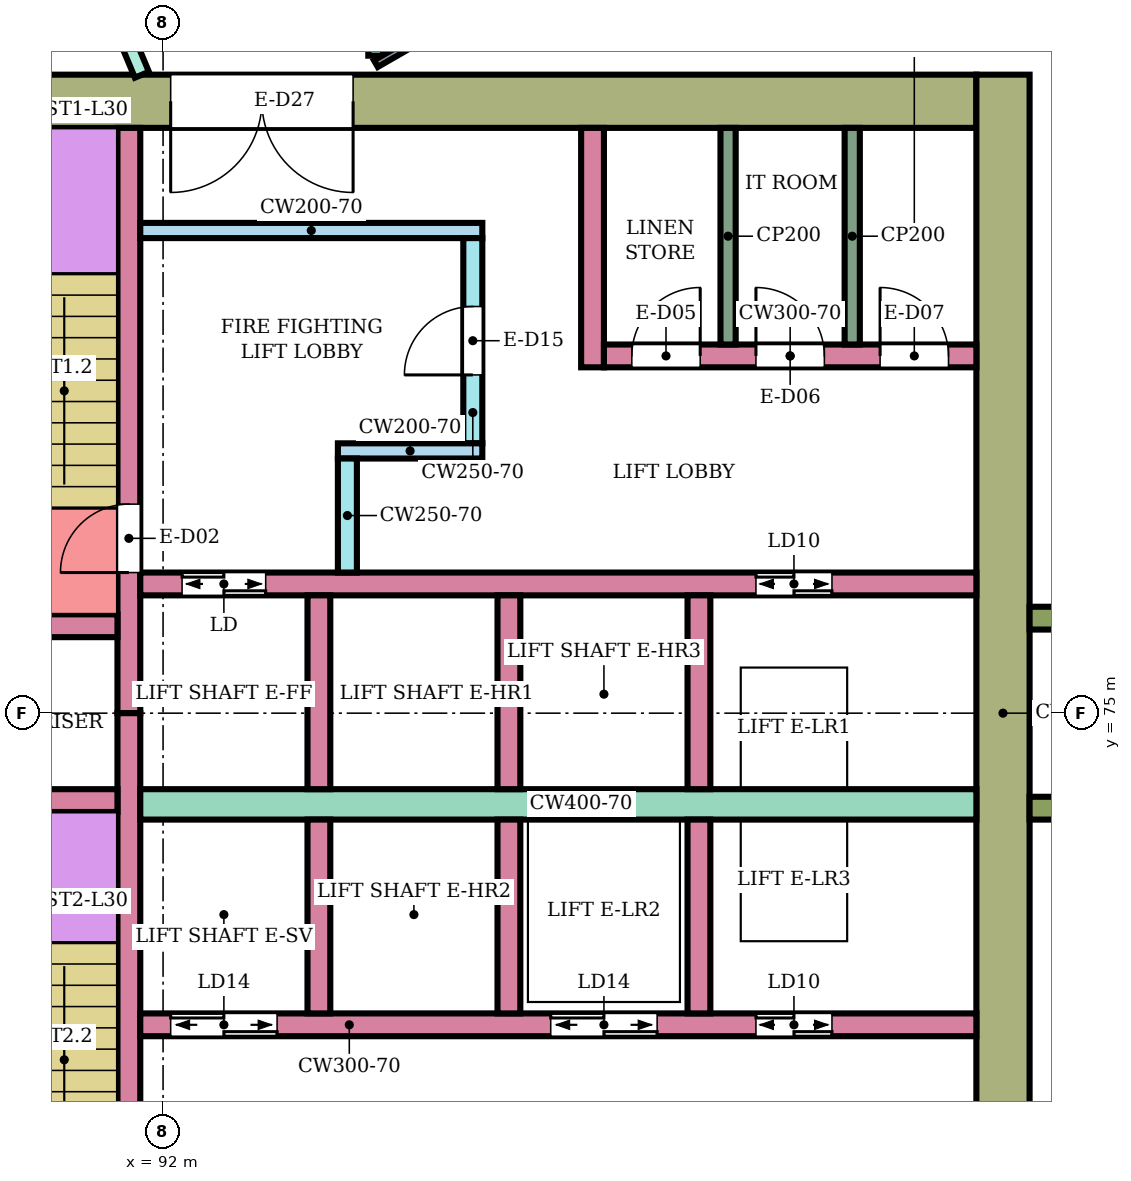
"""IFC4 building model, lengths in metres.
Left out: names, types, materials, properties, quantities, classifications, styles, units other than length and angle.
Written with IfcOpenShell. Run it as: python <this file> out.ifc"""

import sys

from ifc_helpers import new_model, si_unit, direction, frame, frame_2d, origin, place, context, subcontext, project, spatial, rectangle, extrude, element, fill, save


model = new_model("IFC4")
c1 = context("Model", 3, precision=1e-05, world=origin(), true_north=direction((0.0, 1.0)))
c2 = subcontext(c1, "Body", "Model", "MODEL_VIEW")
j1 = project(units=[si_unit("LENGTHUNIT", "METRE"), si_unit("PLANEANGLEUNIT", "RADIAN")], contexts=[c1])
p1 = place(None, origin())
s1 = spatial("IfcSite", under=j1, at=p1, CompositionType="ELEMENT")
p2 = place(p1, origin())
s2 = spatial("IfcBuilding", under=s1, at=p2, CompositionType="ELEMENT")
p3 = place(p2, frame((0.0, 0.0, 130.2)))
s3 = spatial("IfcBuildingStorey", under=s2, at=p3, CompositionType="ELEMENT", Elevation=130.2)
p4 = place(p3, frame((87.9, 83.05, 0.0), z_axis=(0.0, 0.0, 1.0), x_axis=(1.0, 0.0, 0.0)))
e1 = element("IfcWall", 1, at=p4, inside=s3, PredefinedType="SHEAR", context=c2, shape_type="SweptSolid", body=[
    extrude(rectangle(XDim=14.8, YDim=0.7, at=frame_2d((7.4, 0.0))), origin(), (0.0, 0.0, 1.0), 3.58),
])
p5 = place(p4, frame((4.2, 0.0, 0.0)))
e2 = element("IfcOpeningElement", 2, at=p5, cuts=e1, PredefinedType="OPENING", context=c2, shape_type="SweptSolid", body=[
    extrude(rectangle(XDim=2.4, YDim=2.4, at=frame_2d((1.2, 1.2))), frame((0.0, 0.36, 0.0), z_axis=(0.0, -1.0, 0.0), x_axis=(1.0, 0.0, 0.0)), (0.0, 0.0, 1.0), 0.72),
])
p6 = place(p3, frame((103.05, 66.6, 0.0), z_axis=(0.0, 0.0, 1.0), x_axis=(0.0, 1.0, 0.0)))
e3 = element("IfcWall", 3, at=p6, inside=s3, PredefinedType="SHEAR", context=c2, shape_type="SweptSolid", body=[
    extrude(rectangle(XDim=16.8, YDim=0.7, at=frame_2d((8.4, 0.0))), origin(), (0.0, 0.0, 1.0), 3.58),
])
p7 = place(p3, frame((91.55, 75.0, 0.0), z_axis=(0.0, 0.0, 1.0), x_axis=(0.0, 1.0, 0.0)))
e4 = element("IfcWall", 4, at=p7, inside=s3, PredefinedType="SHEAR", context=c2, shape_type="SweptSolid", body=[
    extrude(rectangle(XDim=7.7, YDim=0.3, at=frame_2d((3.85, 0.0))), origin(), (0.0, 0.0, 1.0), 3.58),
])
p8 = place(p7, frame((1.85, 0.0, 0.0)))
e5 = element("IfcOpeningElement", 5, at=p8, cuts=e4, PredefinedType="OPENING", context=c2, shape_type="SweptSolid", body=[
    extrude(rectangle(XDim=0.9, YDim=2.1, at=frame_2d((0.45, 1.05))), frame((0.0, 0.16, 0.0), z_axis=(0.0, -1.0, 0.0), x_axis=(1.0, 0.0, 0.0)), (0.0, 0.0, 1.0), 0.32),
])
p9 = place(p3, frame((91.55, 67.3, 0.0), z_axis=(0.0, 0.0, 1.0), x_axis=(0.0, 1.0, 0.0)))
e6 = element("IfcWall", 6, at=p9, inside=s3, PredefinedType="SHEAR", context=c2, shape_type="SweptSolid", body=[
    extrude(rectangle(XDim=7.7, YDim=0.3, at=frame_2d((3.85, 0.0))), origin(), (0.0, 0.0, 1.0), 3.58),
])
p10 = place(p9, frame((0.35, 0.0, 0.0)))
e7 = element("IfcOpeningElement", 7, at=p10, cuts=e6, PredefinedType="OPENING", context=c2, shape_type="SweptSolid", body=[
    extrude(rectangle(XDim=0.9, YDim=2.1, at=frame_2d((0.45, 1.05))), frame((0.0, 0.16, 0.0), z_axis=(0.0, -1.0, 0.0), x_axis=(1.0, 0.0, 0.0)), (0.0, 0.0, 1.0), 0.32),
])
p11 = place(p3, frame((88.35, 76.15, 0.0), z_axis=(0.0, 0.0, 1.0), x_axis=(1.0, 0.0, 0.0)))
e8 = element("IfcWall", 8, at=p11, inside=s3, PredefinedType="SHEAR", context=c2, shape_type="SweptSolid", body=[
    extrude(rectangle(XDim=3.05, YDim=0.3, at=frame_2d((1.525, 0.0))), origin(), (0.0, 0.0, 1.0), 3.58),
])
p12 = place(p11, frame((1.1, 0.0, 0.0)))
e9 = element("IfcOpeningElement", 9, at=p12, cuts=e8, PredefinedType="OPENING", context=c2, shape_type="SweptSolid", body=[
    extrude(rectangle(XDim=0.7, YDim=2.0, at=frame_2d((0.35, 1.0))), frame((0.0, 0.16, 0.0), z_axis=(0.0, -1.0, 0.0), x_axis=(1.0, 0.0, 0.0)), (0.0, 0.0, 1.0), 0.32),
])
p13 = place(p3, frame((88.35, 73.85, 0.0), z_axis=(0.0, 0.0, 1.0), x_axis=(1.0, 0.0, 0.0)))
e10 = element("IfcWall", 10, at=p13, inside=s3, PredefinedType="SHEAR", context=c2, shape_type="SweptSolid", body=[
    extrude(rectangle(XDim=3.05, YDim=0.3, at=frame_2d((1.525, 0.0))), origin(), (0.0, 0.0, 1.0), 3.58),
])
p14 = place(p3, frame((91.7, 76.7, 0.0), z_axis=(0.0, 0.0, 1.0), x_axis=(1.0, 0.0, 0.0)))
e11 = element("IfcWall", 11, at=p14, inside=s3, PredefinedType="SHEAR", context=c2, shape_type="SweptSolid", body=[
    extrude(rectangle(XDim=11.0, YDim=0.3, at=frame_2d((5.5, 0.0))), origin(), (0.0, 0.0, 1.0), 3.58),
])
p15 = place(p14, frame((0.55, 0.0, 0.0)))
e12 = element("IfcOpeningElement", 12, at=p15, cuts=e11, PredefinedType="OPENING", context=c2, shape_type="SweptSolid", body=[
    extrude(rectangle(XDim=1.1, YDim=2.1, at=frame_2d((0.55, 1.05))), frame((0.0, 0.16, 0.0), z_axis=(0.0, -1.0, 0.0), x_axis=(1.0, 0.0, 0.0)), (0.0, 0.0, 1.0), 0.32),
])
p16 = place(p14, frame((8.1, 0.0, 0.0)))
e13 = element("IfcOpeningElement", 13, at=p16, cuts=e11, PredefinedType="OPENING", context=c2, shape_type="SweptSolid", body=[
    extrude(rectangle(XDim=1.0, YDim=2.1, at=frame_2d((0.5, 1.05))), frame((0.0, 0.16, 0.0), z_axis=(0.0, -1.0, 0.0), x_axis=(1.0, 0.0, 0.0)), (0.0, 0.0, 1.0), 0.32),
])
p17 = place(p3, frame((91.7, 73.8, 0.0), z_axis=(0.0, 0.0, 1.0), x_axis=(1.0, 0.0, 0.0)))
e14 = element("IfcWall", 14, at=p17, inside=s3, PredefinedType="SHEAR", context=c2, shape_type="SweptSolid", body=[
    extrude(rectangle(XDim=11.0, YDim=0.4, at=frame_2d((5.5, 0.0))), origin(), (0.0, 0.0, 1.0), 3.58),
])
p18 = place(p3, frame((91.7, 70.9, 0.0), z_axis=(0.0, 0.0, 1.0), x_axis=(1.0, 0.0, 0.0)))
e15 = element("IfcWall", 15, at=p18, inside=s3, PredefinedType="SHEAR", context=c2, shape_type="SweptSolid", body=[
    extrude(rectangle(XDim=11.0, YDim=0.3, at=frame_2d((5.5, 0.0))), origin(), (0.0, 0.0, 1.0), 3.58),
])
p19 = place(p18, frame((0.4, 0.0, 0.0)))
e16 = element("IfcOpeningElement", 16, at=p19, cuts=e15, PredefinedType="OPENING", context=c2, shape_type="SweptSolid", body=[
    extrude(rectangle(XDim=1.4, YDim=2.1, at=frame_2d((0.7, 1.05))), frame((0.0, 0.16, 0.0), z_axis=(0.0, -1.0, 0.0), x_axis=(1.0, 0.0, 0.0)), (0.0, 0.0, 1.0), 0.32),
])
p20 = place(p18, frame((5.4, 0.0, 0.0)))
e17 = element("IfcOpeningElement", 17, at=p20, cuts=e15, PredefinedType="OPENING", context=c2, shape_type="SweptSolid", body=[
    extrude(rectangle(XDim=1.4, YDim=2.1, at=frame_2d((0.7, 1.05))), frame((0.0, 0.16, 0.0), z_axis=(0.0, -1.0, 0.0), x_axis=(1.0, 0.0, 0.0)), (0.0, 0.0, 1.0), 0.32),
])
p21 = place(p18, frame((8.1, 0.0, 0.0)))
e18 = element("IfcOpeningElement", 18, at=p21, cuts=e15, PredefinedType="OPENING", context=c2, shape_type="SweptSolid", body=[
    extrude(rectangle(XDim=1.0, YDim=2.1, at=frame_2d((0.5, 1.05))), frame((0.0, 0.16, 0.0), z_axis=(0.0, -1.0, 0.0), x_axis=(1.0, 0.0, 0.0)), (0.0, 0.0, 1.0), 0.32),
])
for number, where, z_axis, x_axis in (
    (19, (94.05, 74.0, 0.0), (0.0, 0.0, 1.0), (0.0, 1.0, 0.0)),
    (20, (96.55, 74.0, 0.0), (0.0, 0.0, 1.0), (0.0, 1.0, 0.0)),
    (21, (99.05, 74.0, 0.0), (0.0, 0.0, 1.0), (0.0, 1.0, 0.0)),
    (22, (94.05, 71.05, 0.0), (0.0, 0.0, 1.0), (0.0, 1.0, 0.0)),
    (23, (96.55, 71.05, 0.0), (0.0, 0.0, 1.0), (0.0, 1.0, 0.0)),
    (24, (99.05, 71.05, 0.0), (0.0, 0.0, 1.0), (0.0, 1.0, 0.0)),
):
    element("IfcWall", number, at=place(p3, frame(where, z_axis=z_axis, x_axis=x_axis)), inside=s3, PredefinedType="SHEAR", context=c2, shape_type="SweptSolid", body=[
        extrude(rectangle(XDim=2.55, YDim=0.3, at=frame_2d((1.275, 0.0))), origin(), (0.0, 0.0, 1.0), 3.58),
    ])
p22 = place(p3, frame((91.7, 81.35, 0.0), z_axis=(0.0, 0.0, 1.0), x_axis=(1.0, 0.0, 0.0)))
e25 = element("IfcWall", 25, at=p22, inside=s3, PredefinedType="SHEAR", context=c2, shape_type="SweptSolid", body=[
    extrude(rectangle(XDim=4.5, YDim=0.2, at=frame_2d((2.25, 0.0))), origin(), (0.0, 0.0, 1.0), 3.58),
])
p23 = place(p3, frame((96.075, 78.55, 0.0), z_axis=(0.0, 0.0, 1.0), x_axis=(0.0, 1.0, 0.0)))
e26 = element("IfcWall", 26, at=p23, inside=s3, PredefinedType="SHEAR", context=c2, shape_type="SweptSolid", body=[
    extrude(rectangle(XDim=2.7, YDim=0.25, at=frame_2d((1.35, 0.0))), origin(), (0.0, 0.0, 1.0), 3.58),
])
p24 = place(p23, frame((0.9, 0.0, 0.0)))
e27 = element("IfcOpeningElement", 27, at=p24, cuts=e26, PredefinedType="OPENING", context=c2, shape_type="SweptSolid", body=[
    extrude(rectangle(XDim=0.9, YDim=2.1, at=frame_2d((0.45, 1.05))), frame((0.0, 0.135, 0.0), z_axis=(0.0, -1.0, 0.0), x_axis=(1.0, 0.0, 0.0)), (0.0, 0.0, 1.0), 0.27),
])
p25 = place(p3, frame((94.3, 78.45, 0.0), z_axis=(0.0, 0.0, 1.0), x_axis=(1.0, 0.0, 0.0)))
e28 = element("IfcWall", 28, at=p25, inside=s3, PredefinedType="SHEAR", context=c2, shape_type="SweptSolid", body=[
    extrude(rectangle(XDim=1.9, YDim=0.2, at=frame_2d((0.95, 0.0))), origin(), (0.0, 0.0, 1.0), 3.58),
])
p26 = place(p3, frame((94.425, 76.85, 0.0), z_axis=(0.0, 0.0, 1.0), x_axis=(0.0, 1.0, 0.0)))
e29 = element("IfcWall", 29, at=p26, inside=s3, PredefinedType="SHEAR", context=c2, shape_type="SweptSolid", body=[
    extrude(rectangle(XDim=1.5, YDim=0.25, at=frame_2d((0.75, 0.0))), origin(), (0.0, 0.0, 1.0), 3.58),
])
p27 = place(p3, frame((97.65, 79.55, 0.0), z_axis=(0.0, 0.0, 1.0), x_axis=(0.0, 1.0, 0.0)))
e30 = element("IfcWall", 30, at=p27, inside=s3, PredefinedType="SHEAR", context=c2, shape_type="SweptSolid", body=[
    extrude(rectangle(XDim=3.15, YDim=0.3, at=frame_2d((1.575, 0.0))), origin(), (0.0, 0.0, 1.0), 3.58),
])
p28 = place(p3, frame((97.8, 79.7, 0.0), z_axis=(0.0, 0.0, 1.0), x_axis=(1.0, 0.0, 0.0)))
e31 = element("IfcWall", 31, at=p28, inside=s3, PredefinedType="SHEAR", context=c2, shape_type="SweptSolid", body=[
    extrude(rectangle(XDim=4.9, YDim=0.3, at=frame_2d((2.45, 0.0))), origin(), (0.0, 0.0, 1.0), 3.58),
])
p29 = place(p28, frame((0.367, 0.0, 0.0)))
e32 = element("IfcOpeningElement", 32, at=p29, cuts=e31, PredefinedType="OPENING", context=c2, shape_type="SweptSolid", body=[
    extrude(rectangle(XDim=0.9, YDim=2.1, at=frame_2d((0.45, 1.05))), frame((0.0, 0.16, 0.0), z_axis=(0.0, -1.0, 0.0), x_axis=(1.0, 0.0, 0.0)), (0.0, 0.0, 1.0), 0.32),
])
p30 = place(p28, frame((2.0, 0.0, 0.0)))
e33 = element("IfcOpeningElement", 33, at=p30, cuts=e31, PredefinedType="OPENING", context=c2, shape_type="SweptSolid", body=[
    extrude(rectangle(XDim=0.9, YDim=2.1, at=frame_2d((0.45, 1.05))), frame((0.0, 0.16, 0.0), z_axis=(0.0, -1.0, 0.0), x_axis=(1.0, 0.0, 0.0)), (0.0, 0.0, 1.0), 0.32),
])
p31 = place(p28, frame((3.633, 0.0, 0.0)))
e34 = element("IfcOpeningElement", 34, at=p31, cuts=e31, PredefinedType="OPENING", context=c2, shape_type="SweptSolid", body=[
    extrude(rectangle(XDim=0.9, YDim=2.1, at=frame_2d((0.45, 1.05))), frame((0.0, 0.16, 0.0), z_axis=(0.0, -1.0, 0.0), x_axis=(1.0, 0.0, 0.0)), (0.0, 0.0, 1.0), 0.32),
])
for number, where, z_axis, x_axis in (
    (35, (103.4, 73.75, 0.0), (0.0, 0.0, 1.0), (1.0, 0.0, 0.0)),
    (36, (103.4, 76.25, 0.0), (0.0, 0.0, 1.0), (1.0, 0.0, 0.0)),
):
    element("IfcWall", number, at=place(p3, frame(where, z_axis=z_axis, x_axis=x_axis)), inside=s3, PredefinedType="NOTDEFINED", context=c2, shape_type="SweptSolid", body=[
        extrude(rectangle(XDim=2.416, YDim=0.3, at=frame_2d((1.208, 0.0))), origin(), (0.0, 0.0, 1.0), 3.9),
    ])
p32 = place(p3, frame((88.698, 90.624, 0.0), z_axis=(0.0, 0.0, 1.0), x_axis=(0.386027055918, -0.922487459047, 0.0)))
e37 = element("IfcWall", 37, at=p32, inside=s3, PredefinedType="PARTITIONING", context=c2, shape_type="SweptSolid", body=[
    extrude(rectangle(XDim=7.832, YDim=0.2, at=frame_2d((3.916, 0.0))), origin(), (0.0, 0.0, 1.0), 3.45),
])
p33 = place(p32, frame((1.482, 0.0, 0.0)))
e38 = element("IfcOpeningElement", 38, at=p33, cuts=e37, PredefinedType="OPENING", context=c2, shape_type="SweptSolid", body=[
    extrude(rectangle(XDim=1.0, YDim=2.1, at=frame_2d((0.5, 1.05))), frame((0.0, 0.11, 0.0), z_axis=(0.0, -1.0, 0.0), x_axis=(1.0, 0.0, 0.0)), (0.0, 0.0, 1.0), 0.22),
])
p34 = place(p3, frame((94.8, 83.65, 0.0), z_axis=(0.0, 0.0, 1.0), x_axis=(0.0, 1.0, 0.0)))
e39 = element("IfcWall", 39, at=p34, inside=s3, PredefinedType="PARTITIONING", context=c2, shape_type="SweptSolid", body=[
    extrude(rectangle(XDim=1.25, YDim=0.2, at=frame_2d((0.625, 0.0))), origin(), (0.0, 0.0, 1.0), 3.45),
])
p35 = place(p34, frame((0.062, 0.0, 0.0)))
e40 = element("IfcOpeningElement", 40, at=p35, cuts=e39, PredefinedType="OPENING", context=c2, shape_type="SweptSolid", body=[
    extrude(rectangle(XDim=1.0, YDim=2.1, at=frame_2d((0.5, 1.05))), frame((0.0, 0.11, 0.0), z_axis=(0.0, -1.0, 0.0), x_axis=(1.0, 0.0, 0.0)), (0.0, 0.0, 1.0), 0.22),
])
p36 = place(p3, frame((94.8, 83.545, 0.0), z_axis=(0.0, 0.0, 1.0), x_axis=(0.86602264145, 0.500004784474, 0.0)))
e41 = element("IfcWall", 41, at=p36, inside=s3, PredefinedType="PARTITIONING", context=c2, shape_type="SweptSolid", body=[
    extrude(rectangle(XDim=8.708, YDim=0.1, at=frame_2d((4.354, 0.0))), origin(), (0.0, 0.0, 1.0), 3.45),
])
p37 = place(p36, frame((3.879, 0.0, 0.0)))
e42 = element("IfcOpeningElement", 42, at=p37, cuts=e41, PredefinedType="OPENING", context=c2, shape_type="SweptSolid", body=[
    extrude(rectangle(XDim=0.9, YDim=2.1, at=frame_2d((0.45, 1.05))), frame((0.0, 0.06, 0.0), z_axis=(0.0, -1.0, 0.0), x_axis=(1.0, 0.0, 0.0)), (0.0, 0.0, 1.0), 0.12),
])
for number, where, z_axis, x_axis in (
    (43, (99.433, 79.85, 0.0), (0.0, 0.0, 1.0), (0.0, 1.0, 0.0)),
    (44, (101.067, 79.85, 0.0), (0.0, 0.0, 1.0), (0.0, 1.0, 0.0)),
):
    element("IfcWall", number, at=place(p3, frame(where, z_axis=z_axis, x_axis=x_axis)), inside=s3, PredefinedType="PARTITIONING", context=c2, shape_type="SweptSolid", body=[
        extrude(rectangle(XDim=2.85, YDim=0.2, at=frame_2d((1.425, 0.0))), origin(), (0.0, 0.0, 1.0), 3.58),
    ])
p38 = place(p8, origin())
e45 = element("IfcDoor", 45, at=p38, inside=s3, OperationType="SINGLE_SWING_LEFT", PredefinedType="DOOR", context=c2, shape_type="SweptSolid", body=[
    extrude(rectangle(XDim=0.9, YDim=2.1, at=frame_2d((0.45, 1.05))), frame((0.0, 0.025, 0.0), z_axis=(0.0, -1.0, 0.0), x_axis=(1.0, 0.0, 0.0)), (0.0, 0.0, 1.0), 0.05),
])
fill(e5, e45)
p39 = place(p15, origin())
e46 = element("IfcDoor", 46, at=p39, inside=s3, OperationType="DOUBLE_DOOR_SLIDING", PredefinedType="DOOR", context=c2, shape_type="SweptSolid", body=[
    extrude(rectangle(XDim=1.1, YDim=2.1, at=frame_2d((0.55, 1.05))), frame((0.0, 0.025, 0.0), z_axis=(0.0, -1.0, 0.0), x_axis=(1.0, 0.0, 0.0)), (0.0, 0.0, 1.0), 0.05),
])
fill(e12, e46)
p40 = place(p16, origin())
e47 = element("IfcDoor", 47, at=p40, inside=s3, OperationType="DOUBLE_DOOR_SLIDING", PredefinedType="DOOR", context=c2, shape_type="SweptSolid", body=[
    extrude(rectangle(XDim=1.0, YDim=2.1, at=frame_2d((0.5, 1.05))), frame((0.0, 0.025, 0.0), z_axis=(0.0, -1.0, 0.0), x_axis=(1.0, 0.0, 0.0)), (0.0, 0.0, 1.0), 0.05),
])
fill(e13, e47)
p41 = place(p19, origin())
e48 = element("IfcDoor", 48, at=p41, inside=s3, OperationType="DOUBLE_DOOR_SLIDING", PredefinedType="DOOR", context=c2, shape_type="SweptSolid", body=[
    extrude(rectangle(XDim=1.4, YDim=2.1, at=frame_2d((0.7, 1.05))), frame((0.0, 0.025, 0.0), z_axis=(0.0, -1.0, 0.0), x_axis=(1.0, 0.0, 0.0)), (0.0, 0.0, 1.0), 0.05),
])
fill(e16, e48)
p42 = place(p20, origin())
e49 = element("IfcDoor", 49, at=p42, inside=s3, OperationType="DOUBLE_DOOR_SLIDING", PredefinedType="DOOR", context=c2, shape_type="SweptSolid", body=[
    extrude(rectangle(XDim=1.4, YDim=2.1, at=frame_2d((0.7, 1.05))), frame((0.0, 0.025, 0.0), z_axis=(0.0, -1.0, 0.0), x_axis=(1.0, 0.0, 0.0)), (0.0, 0.0, 1.0), 0.05),
])
fill(e17, e49)
p43 = place(p21, origin())
e50 = element("IfcDoor", 50, at=p43, inside=s3, OperationType="DOUBLE_DOOR_SLIDING", PredefinedType="DOOR", context=c2, shape_type="SweptSolid", body=[
    extrude(rectangle(XDim=1.0, YDim=2.1, at=frame_2d((0.5, 1.05))), frame((0.0, 0.025, 0.0), z_axis=(0.0, -1.0, 0.0), x_axis=(1.0, 0.0, 0.0)), (0.0, 0.0, 1.0), 0.05),
])
fill(e18, e50)
p44 = place(p24, origin())
e51 = element("IfcDoor", 51, at=p44, inside=s3, OperationType="SINGLE_SWING_LEFT", PredefinedType="DOOR", context=c2, shape_type="SweptSolid", body=[
    extrude(rectangle(XDim=0.9, YDim=2.1, at=frame_2d((0.45, 1.05))), frame((0.0, 0.025, 0.0), z_axis=(0.0, -1.0, 0.0), x_axis=(1.0, 0.0, 0.0)), (0.0, 0.0, 1.0), 0.05),
])
fill(e27, e51)
p45 = place(p29, origin())
e52 = element("IfcDoor", 52, at=p45, inside=s3, OperationType="SINGLE_SWING_RIGHT", PredefinedType="DOOR", context=c2, shape_type="SweptSolid", body=[
    extrude(rectangle(XDim=0.9, YDim=2.1, at=frame_2d((0.45, 1.05))), frame((0.0, 0.025, 0.0), z_axis=(0.0, -1.0, 0.0), x_axis=(1.0, 0.0, 0.0)), (0.0, 0.0, 1.0), 0.05),
])
fill(e32, e52)
p46 = place(p30, origin())
e53 = element("IfcDoor", 53, at=p46, inside=s3, OperationType="SINGLE_SWING_LEFT", PredefinedType="DOOR", context=c2, shape_type="SweptSolid", body=[
    extrude(rectangle(XDim=0.9, YDim=2.1, at=frame_2d((0.45, 1.05))), frame((0.0, 0.025, 0.0), z_axis=(0.0, -1.0, 0.0), x_axis=(1.0, 0.0, 0.0)), (0.0, 0.0, 1.0), 0.05),
])
fill(e33, e53)
p47 = place(p31, origin())
e54 = element("IfcDoor", 54, at=p47, inside=s3, OperationType="SINGLE_SWING_LEFT", PredefinedType="DOOR", context=c2, shape_type="SweptSolid", body=[
    extrude(rectangle(XDim=0.9, YDim=2.1, at=frame_2d((0.45, 1.05))), frame((0.0, 0.025, 0.0), z_axis=(0.0, -1.0, 0.0), x_axis=(1.0, 0.0, 0.0)), (0.0, 0.0, 1.0), 0.05),
])
fill(e34, e54)
p48 = place(p5, frame((2.4, 0.0, 0.0), z_axis=(0.0, 0.0, 1.0), x_axis=(-1.0, 0.0, 0.0)))
e55 = element("IfcDoor", 55, at=p48, inside=s3, OperationType="DOUBLE_DOOR_SINGLE_SWING", PredefinedType="DOOR", context=c2, shape_type="SweptSolid", body=[
    extrude(rectangle(XDim=2.4, YDim=2.4, at=frame_2d((1.2, 1.2))), frame((0.0, 0.025, 0.0), z_axis=(0.0, -1.0, 0.0), x_axis=(1.0, 0.0, 0.0)), (0.0, 0.0, 1.0), 0.05),
])
fill(e2, e55)
save(model, sys.argv[1])
